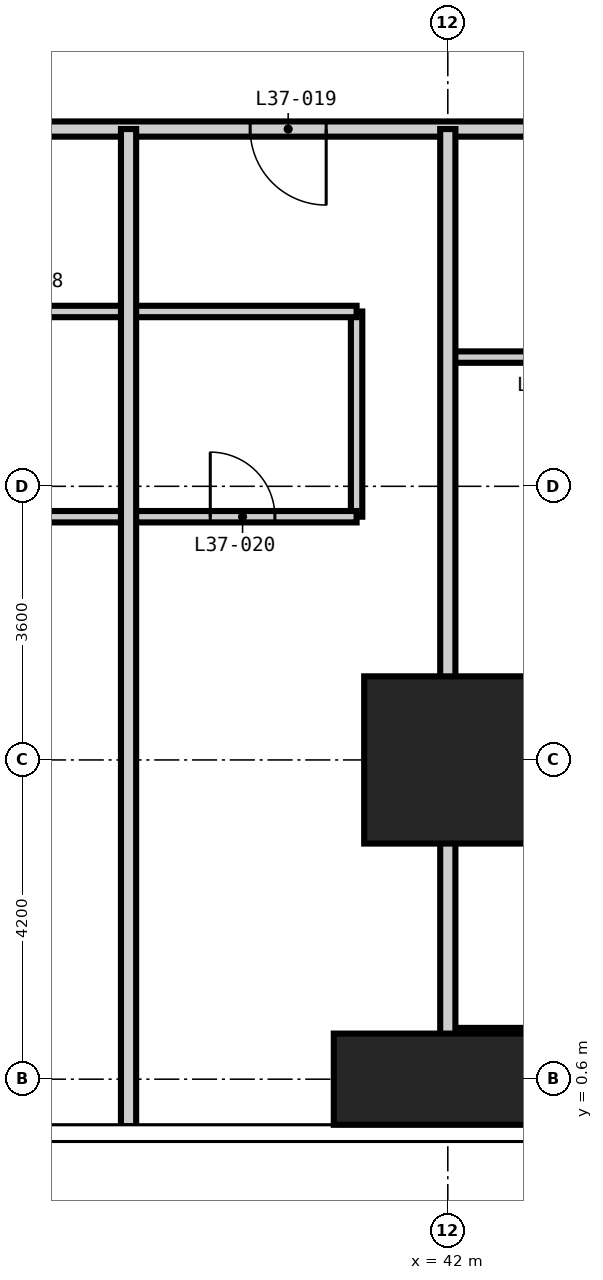
"""IFC4 building model, lengths in metres.
Left out: names, types, materials, properties, quantities, classifications, styles, units other than length and angle.
Written with IfcOpenShell. Run it as: python <this file> out.ifc"""

import sys

from ifc_helpers import new_model, si_unit, direction, frame, frame_2d, origin, origin_2d, place, context, subcontext, project, spatial, rectangle, extrude, element, fill, save


model = new_model("IFC4")
c1 = context("Model", 3, precision=1e-05, world=origin(), true_north=direction((0.0, 1.0)))
c2 = subcontext(c1, "Body", "Model", "MODEL_VIEW")
j1 = project(units=[si_unit("LENGTHUNIT", "METRE"), si_unit("PLANEANGLEUNIT", "RADIAN")], contexts=[c1])
p1 = place(None, origin())
s1 = spatial("IfcSite", under=j1, at=p1, CompositionType="ELEMENT")
p2 = place(p1, origin())
s2 = spatial("IfcBuilding", under=s1, at=p2, CompositionType="ELEMENT")
p3 = place(p2, frame((0.0, 0.0, 144.0)))
s3 = spatial("IfcBuildingStorey", under=s2, at=p3, CompositionType="ELEMENT", Elevation=144.0)
p4 = place(p3, frame((42.0, 0.6, -0.35), z_axis=(0.0, 0.0, 1.0), x_axis=(1.0, 0.0, 0.0)))
e1 = element("IfcColumn", 1, at=p4, inside=s3, PredefinedType="COLUMN", context=c2, shape_type="SweptSolid", body=[
    extrude(rectangle(XDim=3.0, YDim=1.2, at=origin_2d()), origin(), (0.0, 0.0, 1.0), 3.6),
])
p5 = place(p3, frame((42.0, 4.8, -0.35), z_axis=(0.0, 0.0, 1.0), x_axis=(1.0, 0.0, 0.0)))
e2 = element("IfcColumn", 2, at=p5, inside=s3, PredefinedType="COLUMN", context=c2, shape_type="SweptSolid", body=[
    extrude(rectangle(XDim=2.2, YDim=2.2, at=origin_2d()), origin(), (0.0, 0.0, 1.0), 3.6),
])
p6 = place(p3, frame((40.8, 8.0, 0.0), z_axis=(0.0, 0.0, 1.0), x_axis=(0.0, 1.0, 0.0)))
e3 = element("IfcWall", 3, at=p6, inside=s3, PredefinedType="PARTITIONING", context=c2, shape_type="SweptSolid", body=[
    extrude(rectangle(XDim=2.7, YDim=0.15, at=frame_2d((1.35, 0.0))), origin(), (0.0, 0.0, 1.0), 3.25),
])
p7 = place(p3, frame((42.0, 1.2, 0.0), z_axis=(0.0, 0.0, 1.0), x_axis=(1.0, 0.0, 0.0)))
e4 = element("IfcWall", 4, at=p7, inside=s3, PredefinedType="PARTITIONING", context=c2, shape_type="SweptSolid", body=[
    extrude(rectangle(XDim=3.6, YDim=0.15, at=frame_2d((1.8, 0.0))), origin(), (0.0, 0.0, 1.0), 3.25),
])
p8 = place(p7, frame((1.575, 0.0, 0.0)))
e5 = element("IfcOpeningElement", 5, at=p8, cuts=e4, PredefinedType="OPENING", context=c2, shape_type="SweptSolid", body=[
    extrude(rectangle(XDim=0.85, YDim=2.1, at=frame_2d((0.425, 1.05))), frame((0.0, 0.085, 0.0), z_axis=(0.0, -1.0, 0.0), x_axis=(1.0, 0.0, 0.0)), (0.0, 0.0, 1.0), 0.17),
])
p9 = place(p3, frame((34.8, 8.0, 0.0), z_axis=(0.0, 0.0, 1.0), x_axis=(1.0, 0.0, 0.0)))
e6 = element("IfcWall", 6, at=p9, inside=s3, PredefinedType="PARTITIONING", context=c2, shape_type="SweptSolid", body=[
    extrude(rectangle(XDim=6.0, YDim=0.15, at=frame_2d((3.0, 0.0))), origin(), (0.0, 0.0, 1.0), 3.25),
])
p10 = place(p9, frame((4.075, 0.0, 0.0)))
e7 = element("IfcOpeningElement", 7, at=p10, cuts=e6, PredefinedType="OPENING", context=c2, shape_type="SweptSolid", body=[
    extrude(rectangle(XDim=0.85, YDim=2.1, at=frame_2d((0.425, 1.05))), frame((0.0, 0.085, 0.0), z_axis=(0.0, -1.0, 0.0), x_axis=(1.0, 0.0, 0.0)), (0.0, 0.0, 1.0), 0.17),
])
p11 = place(p3, frame((42.0, 10.1, 0.0), z_axis=(0.0, 0.0, 1.0), x_axis=(1.0, 0.0, 0.0)))
e8 = element("IfcWall", 8, at=p11, inside=s3, PredefinedType="PARTITIONING", context=c2, shape_type="SweptSolid", body=[
    extrude(rectangle(XDim=3.1, YDim=0.15, at=frame_2d((1.55, 0.0))), origin(), (0.0, 0.0, 1.0), 3.25),
])
p12 = place(p11, frame((1.125, 0.0, 0.0)))
e9 = element("IfcOpeningElement", 9, at=p12, cuts=e8, PredefinedType="OPENING", context=c2, shape_type="SweptSolid", body=[
    extrude(rectangle(XDim=0.85, YDim=2.1, at=frame_2d((0.425, 1.05))), frame((0.0, 0.085, 0.0), z_axis=(0.0, -1.0, 0.0), x_axis=(1.0, 0.0, 0.0)), (0.0, 0.0, 1.0), 0.17),
])
p13 = place(p3, frame((34.8, 10.7, 0.0), z_axis=(0.0, 0.0, 1.0), x_axis=(1.0, 0.0, 0.0)))
e10 = element("IfcWall", 10, at=p13, inside=s3, PredefinedType="PARTITIONING", context=c2, shape_type="SweptSolid", body=[
    extrude(rectangle(XDim=6.0, YDim=0.15, at=frame_2d((3.0, 0.0))), origin(), (0.0, 0.0, 1.0), 3.25),
])
p14 = place(p13, frame((1.075, 0.0, 0.0)))
e11 = element("IfcOpeningElement", 11, at=p14, cuts=e10, PredefinedType="OPENING", context=c2, shape_type="SweptSolid", body=[
    extrude(rectangle(XDim=0.85, YDim=2.1, at=frame_2d((0.425, 1.05))), frame((0.0, 0.085, 0.0), z_axis=(0.0, -1.0, 0.0), x_axis=(1.0, 0.0, 0.0)), (0.0, 0.0, 1.0), 0.17),
])
p15 = place(p3, frame((45.1, 13.1, 0.0), z_axis=(0.0, 0.0, 1.0), x_axis=(-1.0, 0.0, 0.0)))
e12 = element("IfcWall", 12, at=p15, inside=s3, PredefinedType="PARTITIONING", context=c2, shape_type="SweptSolid", body=[
    extrude(rectangle(XDim=24.1, YDim=0.2, at=frame_2d((12.05, 0.0))), origin(), (0.0, 0.0, 1.0), 3.25),
])
p16 = place(p15, frame((21.5, 0.0, 0.0)))
e13 = element("IfcOpeningElement", 13, at=p16, cuts=e12, PredefinedType="OPENING", context=c2, shape_type="SweptSolid", body=[
    extrude(rectangle(XDim=1.0, YDim=2.2, at=frame_2d((0.5, 1.1))), frame((0.0, 0.11, 0.0), z_axis=(0.0, -1.0, 0.0), x_axis=(1.0, 0.0, 0.0)), (0.0, 0.0, 1.0), 0.22),
])
p17 = place(p15, frame((17.3, 0.0, 0.0)))
e14 = element("IfcOpeningElement", 14, at=p17, cuts=e12, PredefinedType="OPENING", context=c2, shape_type="SweptSolid", body=[
    extrude(rectangle(XDim=1.0, YDim=2.2, at=frame_2d((0.5, 1.1))), frame((0.0, 0.11, 0.0), z_axis=(0.0, -1.0, 0.0), x_axis=(1.0, 0.0, 0.0)), (0.0, 0.0, 1.0), 0.22),
])
p18 = place(p15, frame((11.0, 0.0, 0.0)))
e15 = element("IfcOpeningElement", 15, at=p18, cuts=e12, PredefinedType="OPENING", context=c2, shape_type="SweptSolid", body=[
    extrude(rectangle(XDim=1.0, YDim=2.2, at=frame_2d((0.5, 1.1))), frame((0.0, 0.11, 0.0), z_axis=(0.0, -1.0, 0.0), x_axis=(1.0, 0.0, 0.0)), (0.0, 0.0, 1.0), 0.22),
])
p19 = place(p15, frame((4.7, 0.0, 0.0)))
e16 = element("IfcOpeningElement", 16, at=p19, cuts=e12, PredefinedType="OPENING", context=c2, shape_type="SweptSolid", body=[
    extrude(rectangle(XDim=1.0, YDim=2.2, at=frame_2d((0.5, 1.1))), frame((0.0, 0.11, 0.0), z_axis=(0.0, -1.0, 0.0), x_axis=(1.0, 0.0, 0.0)), (0.0, 0.0, 1.0), 0.22),
])
for number, where, z_axis, x_axis in (
    (17, (37.8, -0.018, 0.0), (0.0, 0.0, 1.0), (0.0, 1.0, 0.0)),
    (18, (42.0, -0.018, 0.0), (0.0, 0.0, 1.0), (0.0, 1.0, 0.0)),
):
    element("IfcWall", number, at=place(p3, frame(where, z_axis=z_axis, x_axis=x_axis)), inside=s3, PredefinedType="PARTITIONING", context=c2, shape_type="SweptSolid", body=[
        extrude(rectangle(XDim=13.118, YDim=0.2, at=frame_2d((6.559, 0.0))), origin(), (0.0, 0.0, 1.0), 3.25),
    ])
p20 = place(p3, frame((42.0, 4.2, 0.0), z_axis=(0.0, 0.0, 1.0), x_axis=(1.0, 0.0, 0.0)))
e19 = element("IfcWall", 19, at=p20, inside=s3, PredefinedType="PARTITIONING", context=c2, shape_type="SweptSolid", body=[
    extrude(rectangle(XDim=12.618, YDim=0.15, at=frame_2d((6.309, 0.0))), origin(), (0.0, 0.0, 1.0), 3.25),
])
p21 = place(p20, frame((9.55, 0.0, 0.0)))
e20 = element("IfcOpeningElement", 20, at=p21, cuts=e19, PredefinedType="OPENING", context=c2, shape_type="SweptSolid", body=[
    extrude(rectangle(XDim=0.9, YDim=2.1, at=frame_2d((0.45, 1.05))), frame((0.0, 0.085, 0.0), z_axis=(0.0, -1.0, 0.0), x_axis=(1.0, 0.0, 0.0)), (0.0, 0.0, 1.0), 0.17),
])
p22 = place(p19, origin())
e21 = element("IfcDoor", 21, at=p22, inside=s3, OperationType="SINGLE_SWING_LEFT", PredefinedType="DOOR", context=c2, shape_type="SweptSolid", body=[
    extrude(rectangle(XDim=1.0, YDim=2.2, at=frame_2d((0.5, 1.1))), frame((0.0, 0.025, 0.0), z_axis=(0.0, -1.0, 0.0), x_axis=(1.0, 0.0, 0.0)), (0.0, 0.0, 1.0), 0.05),
])
fill(e16, e21)
p23 = place(p10, origin())
e22 = element("IfcDoor", 22, at=p23, inside=s3, OperationType="SINGLE_SWING_LEFT", PredefinedType="DOOR", context=c2, shape_type="SweptSolid", body=[
    extrude(rectangle(XDim=0.85, YDim=2.1, at=frame_2d((0.425, 1.05))), frame((0.0, 0.025, 0.0), z_axis=(0.0, -1.0, 0.0), x_axis=(1.0, 0.0, 0.0)), (0.0, 0.0, 1.0), 0.05),
])
fill(e7, e22)
save(model, sys.argv[1])
